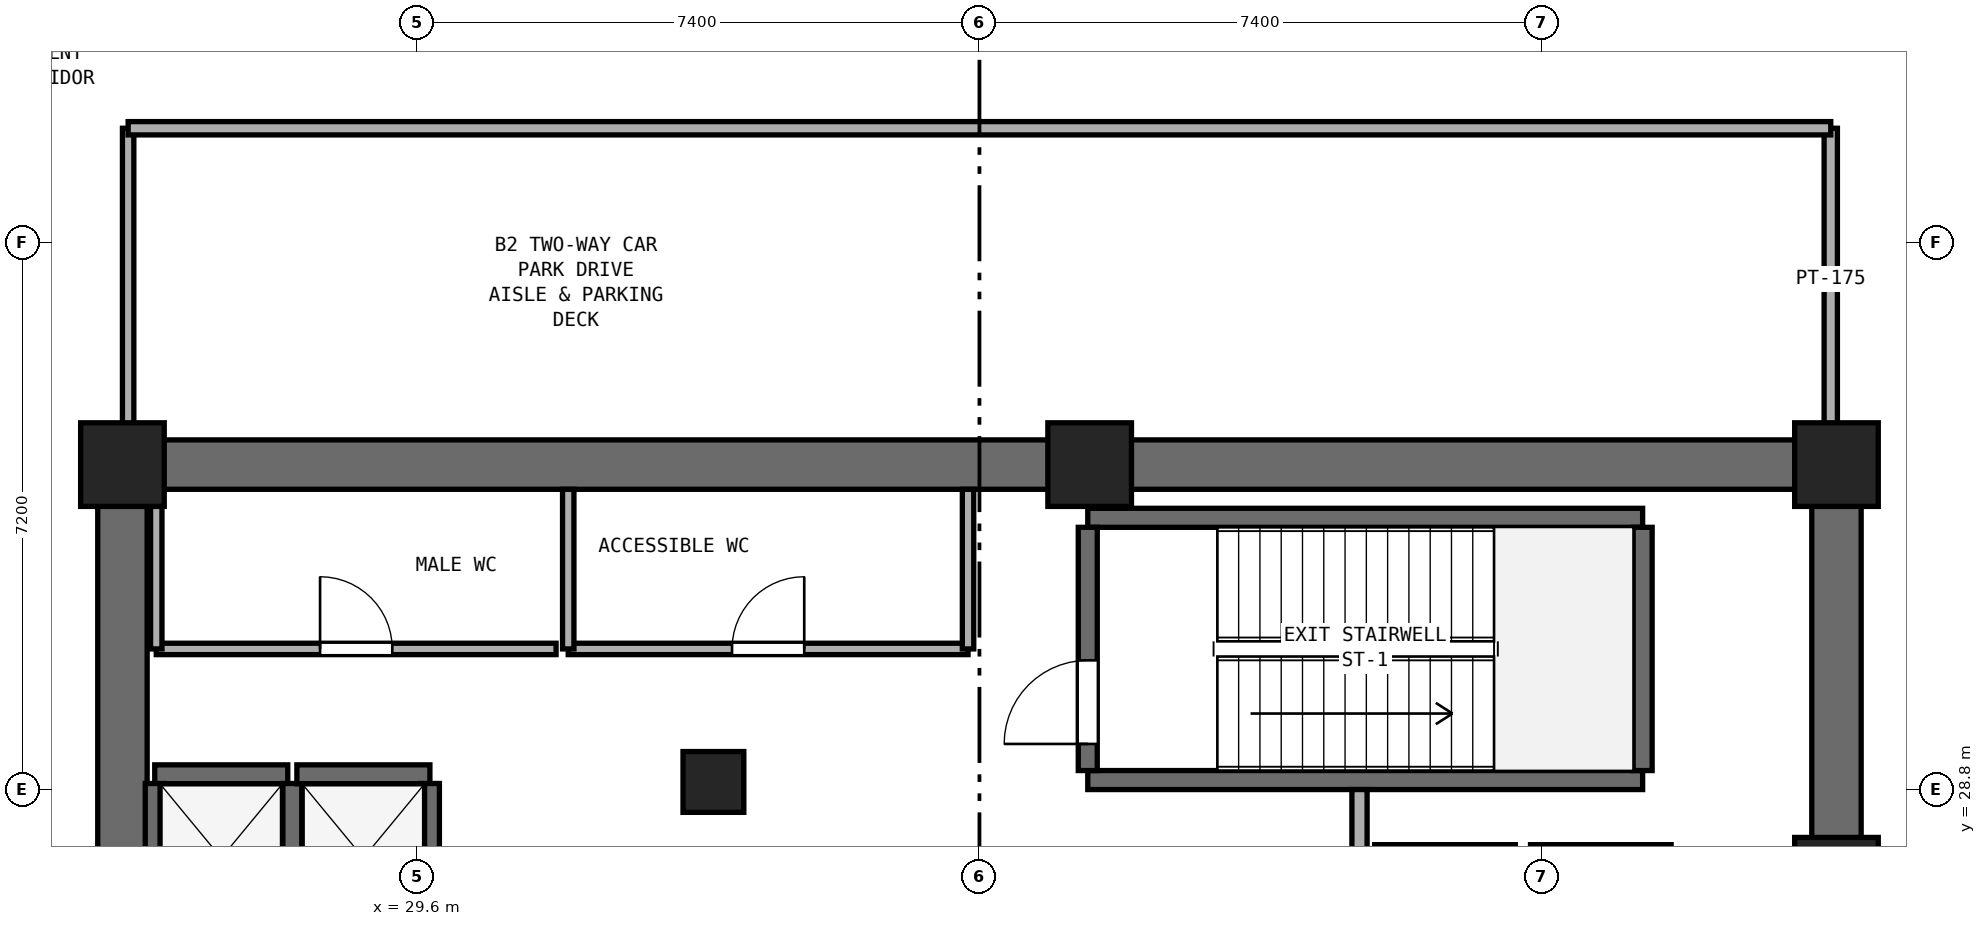
"""IFC4 building model, lengths in metres.
Left out: names, types, materials, properties, quantities, classifications, styles, units other than length and angle.
Written with IfcOpenShell. Run it as: python <this file> out.ifc"""

import sys

from ifc_helpers import new_model, si_unit, direction, frame, frame_2d, origin, origin_2d, place, context, subcontext, project, spatial, rectangle, extrude, element, fill, save


model = new_model("IFC4")
c1 = context("Model", 3, precision=1e-05, world=origin(), true_north=direction((0.0, 1.0)))
c2 = subcontext(c1, "Body", "Model", "MODEL_VIEW")
j1 = project(units=[si_unit("LENGTHUNIT", "METRE"), si_unit("PLANEANGLEUNIT", "RADIAN")], contexts=[c1])
p1 = place(None, origin())
s1 = spatial("IfcSite", under=j1, at=p1, CompositionType="ELEMENT")
p2 = place(p1, origin())
s2 = spatial("IfcBuilding", under=s1, at=p2, CompositionType="ELEMENT")
p3 = place(p2, frame((0.0, 0.0, -9.6)))
s3 = spatial("IfcBuildingStorey", under=s2, at=p3, CompositionType="ELEMENT", Elevation=-9.6)
p4 = place(p3, frame((25.4, 33.075, 0.0), z_axis=(0.0, 0.0, 1.0), x_axis=(1.0, 0.0, 0.0)))
e1 = element("IfcWall", 1, at=p4, inside=s3, PredefinedType="SHEAR", context=c2, shape_type="SweptSolid", body=[
    extrude(rectangle(XDim=23.2, YDim=0.65, at=frame_2d((11.6, 0.0))), origin(), (0.0, 0.0, 1.0), 4.45),
])
p5 = place(p3, frame((25.725, 17.65, 0.0), z_axis=(0.0, 0.0, 1.0), x_axis=(0.0, 1.0, 0.0)))
e2 = element("IfcWall", 2, at=p5, inside=s3, PredefinedType="SHEAR", context=c2, shape_type="SweptSolid", body=[
    extrude(rectangle(XDim=15.1, YDim=0.65, at=frame_2d((7.55, 0.0))), origin(), (0.0, 0.0, 1.0), 4.45),
])
p6 = place(p5, frame((6.8, 0.0, 0.0)))
e3 = element("IfcOpeningElement", 3, at=p6, cuts=e2, PredefinedType="OPENING", context=c2, shape_type="SweptSolid", body=[
    extrude(rectangle(XDim=1.5, YDim=2.15, at=frame_2d((0.75, 1.075))), frame((0.0, 0.335, 0.0), z_axis=(0.0, -1.0, 0.0), x_axis=(1.0, 0.0, 0.0)), (0.0, 0.0, 1.0), 0.67),
])
p7 = place(p3, frame((48.275, 17.65, 0.0), z_axis=(0.0, 0.0, 1.0), x_axis=(0.0, 1.0, 0.0)))
e4 = element("IfcWall", 4, at=p7, inside=s3, PredefinedType="SHEAR", context=c2, shape_type="SweptSolid", body=[
    extrude(rectangle(XDim=15.1, YDim=0.65, at=frame_2d((7.55, 0.0))), origin(), (0.0, 0.0, 1.0), 4.45),
])
p8 = place(p7, frame((5.65, 0.0, 0.0)))
e5 = element("IfcOpeningElement", 5, at=p8, cuts=e4, PredefinedType="OPENING", context=c2, shape_type="SweptSolid", body=[
    extrude(rectangle(XDim=1.5, YDim=2.15, at=frame_2d((0.75, 1.075))), frame((0.0, 0.335, 0.0), z_axis=(0.0, -1.0, 0.0), x_axis=(1.0, 0.0, 0.0)), (0.0, 0.0, 1.0), 0.67),
])
for number, where, z_axis, x_axis in (
    (6, (48.275, 27.62, 0.0), (0.0, 0.0, 1.0), (1.0, 0.0, 0.0)),
    (7, (48.275, 33.075, 0.0), (0.0, 0.0, 1.0), (1.0, 0.0, 0.0)),
    (8, (38.45, 33.075, 0.0), (0.0, 0.0, 1.0), (1.0, 0.0, 0.0)),
    (9, (25.725, 33.075, 0.0), (0.0, 0.0, 1.0), (1.0, 0.0, 0.0)),
):
    element("IfcColumn", number, at=place(p3, frame(where, z_axis=z_axis, x_axis=x_axis)), inside=s3, PredefinedType="PILASTER", context=c2, shape_type="SweptSolid", body=[
        extrude(rectangle(XDim=1.1, YDim=1.1, at=origin_2d()), origin(), (0.0, 0.0, 1.0), 4.8),
    ])
p9 = place(p3, frame((33.5, 28.9, 0.0), z_axis=(0.0, 0.0, 1.0), x_axis=(1.0, 0.0, 0.0)))
e10 = element("IfcColumn", 10, at=p9, inside=s3, PredefinedType="COLUMN", context=c2, shape_type="SweptSolid", body=[
    extrude(rectangle(XDim=0.8, YDim=0.8, at=origin_2d()), origin(), (0.0, 0.0, 1.0), 4.8),
])
for number, where, z_axis, x_axis in (
    (11, (38.425, 28.925, 0.0), (0.0, 0.0, 1.0), (1.0, 0.0, 0.0)),
    (12, (38.425, 32.375, 0.0), (0.0, 0.0, 1.0), (1.0, 0.0, 0.0)),
):
    element("IfcWall", number, at=place(p3, frame(where, z_axis=z_axis, x_axis=x_axis)), inside=s3, PredefinedType="SHEAR", context=c2, shape_type="SweptSolid", body=[
        extrude(rectangle(XDim=7.3, YDim=0.25, at=frame_2d((3.65, 0.0))), origin(), (0.0, 0.0, 1.0), 4.45),
    ])
p10 = place(p3, frame((38.425, 29.05, 0.0), z_axis=(0.0, 0.0, 1.0), x_axis=(0.0, 1.0, 0.0)))
e13 = element("IfcWall", 13, at=p10, inside=s3, PredefinedType="SHEAR", context=c2, shape_type="SweptSolid", body=[
    extrude(rectangle(XDim=3.2, YDim=0.25, at=frame_2d((1.6, 0.0))), origin(), (0.0, 0.0, 1.0), 4.45),
])
p11 = place(p10, frame((0.35, 0.0, 0.0)))
e14 = element("IfcOpeningElement", 14, at=p11, cuts=e13, PredefinedType="OPENING", context=c2, shape_type="SweptSolid", body=[
    extrude(rectangle(XDim=1.1, YDim=2.15, at=frame_2d((0.55, 1.075))), frame((0.0, 0.135, 0.0), z_axis=(0.0, -1.0, 0.0), x_axis=(1.0, 0.0, 0.0)), (0.0, 0.0, 1.0), 0.27),
])
p12 = place(p3, frame((45.725, 29.05, 0.0), z_axis=(0.0, 0.0, 1.0), x_axis=(0.0, 1.0, 0.0)))
e15 = element("IfcWall", 15, at=p12, inside=s3, PredefinedType="SHEAR", context=c2, shape_type="SweptSolid", body=[
    extrude(rectangle(XDim=3.2, YDim=0.25, at=frame_2d((1.6, 0.0))), origin(), (0.0, 0.0, 1.0), 4.45),
])
p13 = place(p3, frame((26.15, 29.0, 0.0), z_axis=(0.0, 0.0, 1.0), x_axis=(1.0, 0.0, 0.0)))
e16 = element("IfcWall", 16, at=p13, inside=s3, PredefinedType="SHEAR", context=c2, shape_type="SweptSolid", body=[
    extrude(rectangle(XDim=1.75, YDim=0.25, at=frame_2d((0.875, 0.0))), origin(), (0.0, 0.0, 1.0), 4.45),
])
for number, where, z_axis, x_axis in (
    (17, (26.15, 26.92, 0.0), (0.0, 0.0, 1.0), (0.0, 1.0, 0.0)),
    (18, (27.96, 26.92, 0.0), (0.0, 0.0, 1.0), (0.0, 1.0, 0.0)),
):
    element("IfcWall", number, at=place(p3, frame(where, z_axis=z_axis, x_axis=x_axis)), inside=s3, PredefinedType="SHEAR", context=c2, shape_type="SweptSolid", body=[
        extrude(rectangle(XDim=1.96, YDim=0.25, at=frame_2d((0.98, 0.0))), origin(), (0.0, 0.0, 1.0), 4.45),
    ])
p14 = place(p3, frame((28.02, 29.0, 0.0), z_axis=(0.0, 0.0, 1.0), x_axis=(1.0, 0.0, 0.0)))
e19 = element("IfcWall", 19, at=p14, inside=s3, PredefinedType="SHEAR", context=c2, shape_type="SweptSolid", body=[
    extrude(rectangle(XDim=1.75, YDim=0.25, at=frame_2d((0.875, 0.0))), origin(), (0.0, 0.0, 1.0), 4.45),
])
p15 = place(p3, frame((29.77, 26.92, 0.0), z_axis=(0.0, 0.0, 1.0), x_axis=(0.0, 1.0, 0.0)))
e20 = element("IfcWall", 20, at=p15, inside=s3, PredefinedType="SHEAR", context=c2, shape_type="SweptSolid", body=[
    extrude(rectangle(XDim=1.96, YDim=0.25, at=frame_2d((0.98, 0.0))), origin(), (0.0, 0.0, 1.0), 4.45),
])
for number, where, z_axis, x_axis in (
    (21, (42.2, 27.95, 0.0), (0.0, 0.0, 1.0), (1.0, 0.0, 0.0)),
    (22, (44.25, 27.95, 0.0), (0.0, 0.0, 1.0), (1.0, 0.0, 0.0)),
):
    element("IfcWall", number, at=place(p3, frame(where, z_axis=z_axis, x_axis=x_axis)), inside=s3, PredefinedType="SHEAR", context=c2, shape_type="SweptSolid", body=[
        extrude(rectangle(XDim=1.85, YDim=0.25, at=frame_2d((0.925, 0.0))), origin(), (0.0, 0.0, 1.0), 4.45),
    ])
p16 = place(p3, frame((42.0, 22.75, 0.0), z_axis=(0.0, 0.0, 1.0), x_axis=(0.0, 1.0, 0.0)))
e23 = element("IfcWall", 23, at=p16, inside=s3, PredefinedType="SOLIDWALL", context=c2, shape_type="SweptSolid", body=[
    extrude(rectangle(XDim=6.05, YDim=0.2, at=frame_2d((3.025, 0.0))), origin(), (0.0, 0.0, 1.0), 4.45),
])
p17 = place(p16, frame((0.65, 0.0, 0.0)))
e24 = element("IfcOpeningElement", 24, at=p17, cuts=e23, PredefinedType="OPENING", context=c2, shape_type="SweptSolid", body=[
    extrude(rectangle(XDim=1.2, YDim=2.15, at=frame_2d((0.6, 1.075))), frame((0.0, 0.11, 0.0), z_axis=(0.0, -1.0, 0.0), x_axis=(1.0, 0.0, 0.0)), (0.0, 0.0, 1.0), 0.22),
])
p18 = place(p3, frame((26.17, 30.65, 0.0), z_axis=(0.0, 0.0, 1.0), x_axis=(1.0, 0.0, 0.0)))
e25 = element("IfcWall", 25, at=p18, inside=s3, PredefinedType="PARTITIONING", context=c2, shape_type="SweptSolid", body=[
    extrude(rectangle(XDim=5.26, YDim=0.15, at=frame_2d((2.63, 0.0))), origin(), (0.0, 0.0, 1.0), 4.45),
])
p19 = place(p18, frame((2.155, 0.0, 0.0)))
e26 = element("IfcOpeningElement", 26, at=p19, cuts=e25, PredefinedType="OPENING", context=c2, shape_type="SweptSolid", body=[
    extrude(rectangle(XDim=0.95, YDim=2.1, at=frame_2d((0.475, 1.05))), frame((0.0, 0.085, 0.0), z_axis=(0.0, -1.0, 0.0), x_axis=(1.0, 0.0, 0.0)), (0.0, 0.0, 1.0), 0.17),
])
p20 = place(p3, frame((26.17, 30.65, 0.0), z_axis=(0.0, 0.0, 1.0), x_axis=(0.0, 1.0, 0.0)))
e27 = element("IfcWall", 27, at=p20, inside=s3, PredefinedType="PARTITIONING", context=c2, shape_type="SweptSolid", body=[
    extrude(rectangle(XDim=2.1, YDim=0.15, at=frame_2d((1.05, 0.0))), origin(), (0.0, 0.0, 1.0), 4.45),
])
p21 = place(p3, frame((31.59, 30.65, 0.0), z_axis=(0.0, 0.0, 1.0), x_axis=(1.0, 0.0, 0.0)))
e28 = element("IfcWall", 28, at=p21, inside=s3, PredefinedType="PARTITIONING", context=c2, shape_type="SweptSolid", body=[
    extrude(rectangle(XDim=5.26, YDim=0.15, at=frame_2d((2.63, 0.0))), origin(), (0.0, 0.0, 1.0), 4.45),
])
p22 = place(p21, frame((2.155, 0.0, 0.0)))
e29 = element("IfcOpeningElement", 29, at=p22, cuts=e28, PredefinedType="OPENING", context=c2, shape_type="SweptSolid", body=[
    extrude(rectangle(XDim=0.95, YDim=2.1, at=frame_2d((0.475, 1.05))), frame((0.0, 0.085, 0.0), z_axis=(0.0, -1.0, 0.0), x_axis=(1.0, 0.0, 0.0)), (0.0, 0.0, 1.0), 0.17),
])
for number, where, z_axis, x_axis in (
    (30, (31.59, 30.65, 0.0), (0.0, 0.0, 1.0), (0.0, 1.0, 0.0)),
    (31, (36.85, 30.65, 0.0), (0.0, 0.0, 1.0), (0.0, 1.0, 0.0)),
):
    element("IfcWall", number, at=place(p3, frame(where, z_axis=z_axis, x_axis=x_axis)), inside=s3, PredefinedType="PARTITIONING", context=c2, shape_type="SweptSolid", body=[
        extrude(rectangle(XDim=2.1, YDim=0.15, at=frame_2d((1.05, 0.0))), origin(), (0.0, 0.0, 1.0), 4.45),
    ])
p23 = place(p3, frame((48.2, 33.54, 0.0), z_axis=(0.0, 0.0, 1.0), x_axis=(0.0, 1.0, 0.0)))
e32 = element("IfcWall", 32, at=p23, inside=s3, PredefinedType="PARTITIONING", context=c2, shape_type="SweptSolid", body=[
    extrude(rectangle(XDim=3.96, YDim=0.175, at=frame_2d((1.98, 0.0))), origin(), (0.0, 0.0, 1.0), 4.45),
])
p24 = place(p3, frame((25.8, 33.54, 0.0), z_axis=(0.0, 0.0, 1.0), x_axis=(0.0, 1.0, 0.0)))
e33 = element("IfcWall", 33, at=p24, inside=s3, PredefinedType="PARTITIONING", context=c2, shape_type="SweptSolid", body=[
    extrude(rectangle(XDim=3.96, YDim=0.15, at=frame_2d((1.98, 0.0))), origin(), (0.0, 0.0, 1.0), 4.45),
])
p25 = place(p3, frame((25.8, 37.5, 0.0), z_axis=(0.0, 0.0, 1.0), x_axis=(1.0, 0.0, 0.0)))
e34 = element("IfcWall", 34, at=p25, inside=s3, PredefinedType="PARTITIONING", context=c2, shape_type="SweptSolid", body=[
    extrude(rectangle(XDim=22.4, YDim=0.175, at=frame_2d((11.2, 0.0))), origin(), (0.0, 0.0, 1.0), 4.45),
])
p26 = place(p11, origin())
e35 = element("IfcDoor", 35, at=p26, inside=s3, OperationType="SINGLE_SWING_LEFT", PredefinedType="DOOR", context=c2, shape_type="SweptSolid", body=[
    extrude(rectangle(XDim=1.1, YDim=2.15, at=frame_2d((0.55, 1.075))), frame((0.0, 0.025, 0.0), z_axis=(0.0, -1.0, 0.0), x_axis=(1.0, 0.0, 0.0)), (0.0, 0.0, 1.0), 0.05),
])
fill(e14, e35)
p27 = place(p19, origin())
e36 = element("IfcDoor", 36, at=p27, inside=s3, OperationType="SINGLE_SWING_LEFT", PredefinedType="DOOR", context=c2, shape_type="SweptSolid", body=[
    extrude(rectangle(XDim=0.95, YDim=2.1, at=frame_2d((0.475, 1.05))), frame((0.0, 0.025, 0.0), z_axis=(0.0, -1.0, 0.0), x_axis=(1.0, 0.0, 0.0)), (0.0, 0.0, 1.0), 0.05),
])
fill(e26, e36)
p28 = place(p22, origin())
e37 = element("IfcDoor", 37, at=p28, inside=s3, OperationType="SINGLE_SWING_RIGHT", PredefinedType="DOOR", context=c2, shape_type="SweptSolid", body=[
    extrude(rectangle(XDim=0.95, YDim=2.1, at=frame_2d((0.475, 1.05))), frame((0.0, 0.025, 0.0), z_axis=(0.0, -1.0, 0.0), x_axis=(1.0, 0.0, 0.0)), (0.0, 0.0, 1.0), 0.05),
])
fill(e29, e37)
save(model, sys.argv[1])
